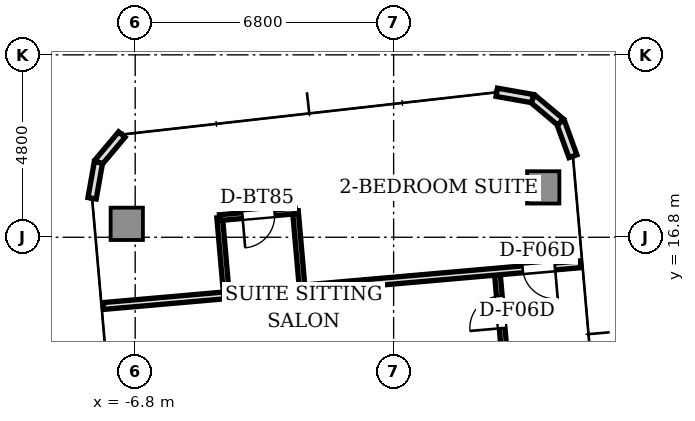
"""IFC4 building model, lengths in metres.
Left out: names, types, materials, properties, quantities, classifications, styles, units other than length and angle.
Written with IfcOpenShell. Run it as: python <this file> out.ifc"""

import sys

from ifc_helpers import new_model, si_unit, direction, frame, frame_2d, origin, origin_2d, place, context, subcontext, project, spatial, rectangle, extrude, source, transform, mapped, element, fill, save


model = new_model("IFC4")
c1 = context("Model", 3, precision=1e-05, world=origin(), true_north=direction((0.0, 1.0)))
c2 = subcontext(c1, "Body", "Model", "MODEL_VIEW")
j1 = project(units=[si_unit("LENGTHUNIT", "METRE"), si_unit("PLANEANGLEUNIT", "RADIAN")], contexts=[c1])
p1 = place(None, origin())
s1 = spatial("IfcSite", under=j1, at=p1, CompositionType="ELEMENT")
p2 = place(p1, origin())
s2 = spatial("IfcBuilding", under=s1, at=p2, CompositionType="ELEMENT")
p3 = place(p2, frame((0.0, 0.0, 198.65)))
s3 = spatial("IfcBuildingStorey", under=s2, at=p3, CompositionType="ELEMENT", Elevation=198.65)
m1 = source(origin(), c2, "Body", "SweptSolid", [
    extrude(rectangle(XDim=0.85, YDim=0.85, at=origin_2d()), origin(), (0.0, 0.0, 1.0), 3.03),
])
for number, where, z_axis, x_axis in (
    (1, (3.936, 18.112, 0.0), (0.0, 0.0, 1.0), (1.0, 0.0, 0.0)),
    (2, (-7.022, 17.153, 0.0), (0.0, 0.0, 1.0), (1.0, 0.0, 0.0)),
):
    element("IfcColumn", number, at=place(p3, frame(where, z_axis=z_axis, x_axis=x_axis)), inside=s3, PredefinedType="COLUMN", context=c2, shape_type="MappedRepresentation", body=[
        mapped(m1, transform((0.0, 0.0, 0.0), scale=1.0)),
    ])
p4 = place(p3, frame((4.718, 18.933, 0.0), z_axis=(0.0, 0.0, 1.0), x_axis=(-0.34188635151, 0.939741306239, 0.0)))
e3 = element("IfcWall", 3, at=p4, inside=s3, PredefinedType="STANDARD", context=c2, shape_type="SweptSolid", body=[
    extrude(rectangle(XDim=0.958, YDim=0.22, at=frame_2d((0.479, 0.0))), origin(), (0.0, 0.0, 1.0), 3.03),
])
for number, where, z_axis, x_axis in (
    (4, (4.39, 19.833, 0.0), (0.0, 0.0, 1.0), (-0.766, 0.643, 0.0)),
    (5, (3.657, 20.449, 0.0), (0.0, 0.0, 1.0), (-0.985, 0.174, 0.0)),
):
    element("IfcWall", number, at=place(p3, frame(where, z_axis=z_axis, x_axis=x_axis)), inside=s3, PredefinedType="STANDARD", context=c2, shape_type="SweptSolid", body=[
        extrude(rectangle(XDim=0.958, YDim=0.22, at=frame_2d((0.479, 0.0))), origin(), (0.0, 0.0, 1.0), 3.03),
    ])
for number, where, z_axis, x_axis in (
    (6, (-7.152, 19.503, 0.0), (0.0, 0.0, 1.0), (-0.643, -0.766, 0.0)),
    (7, (-7.768, 18.769, 0.0), (0.0, 0.0, 1.0), (-0.174, -0.985, 0.0)),
):
    element("IfcWall", number, at=place(p3, frame(where, z_axis=z_axis, x_axis=x_axis)), inside=s3, PredefinedType="STANDARD", context=c2, shape_type="SweptSolid", body=[
        extrude(rectangle(XDim=0.958, YDim=0.22, at=frame_2d((0.479, 0.0))), origin(), (0.0, 0.0, 1.0), 3.03),
    ])
p5 = place(p3, frame((3.095, 11.664, 0.0), z_axis=(0.0, 0.0, 1.0), x_axis=(-0.087142722004, 0.996195837173, 0.0)))
e8 = element("IfcWall", 8, at=p5, inside=s3, PredefinedType="PARTITIONING", context=c2, shape_type="SweptSolid", body=[
    extrude(rectangle(XDim=4.25, YDim=0.15, at=frame_2d((2.125, 0.0))), origin(), (0.0, 0.0, 1.0), 2.58),
])
p6 = place(p5, frame((0.63, 0.0, 0.0)))
e9 = element("IfcOpeningElement", 9, at=p6, cuts=e8, PredefinedType="OPENING", context=c2, shape_type="SweptSolid", body=[
    extrude(rectangle(XDim=0.85, YDim=2.1, at=frame_2d((0.425, 1.05))), frame((0.0, 0.085, 0.0), z_axis=(0.0, -1.0, 0.0), x_axis=(1.0, 0.0, 0.0)), (0.0, 0.0, 1.0), 0.17),
])
p7 = place(p5, frame((2.755, 0.0, 0.0)))
e10 = element("IfcOpeningElement", 10, at=p7, cuts=e8, PredefinedType="OPENING", context=c2, shape_type="SweptSolid", body=[
    extrude(rectangle(XDim=0.85, YDim=2.1, at=frame_2d((0.425, 1.05))), frame((0.0, 0.085, 0.0), z_axis=(0.0, -1.0, 0.0), x_axis=(1.0, 0.0, 0.0)), (0.0, 0.0, 1.0), 0.17),
])
p8 = place(p3, frame((4.917, 16.09, 0.0), z_axis=(0.0, 0.0, 1.0), x_axis=(-0.996196619285, -0.087133780622, 0.0)))
e11 = element("IfcWall", 11, at=p8, inside=s3, PredefinedType="PARTITIONING", context=c2, shape_type="SweptSolid", body=[
    extrude(rectangle(XDim=12.6, YDim=0.18, at=frame_2d((6.3, 0.0))), origin(), (0.0, 0.0, 1.0), 2.58),
])
p9 = place(p8, frame((0.675, 0.0, 0.0)))
e12 = element("IfcOpeningElement", 12, at=p9, cuts=e11, PredefinedType="OPENING", context=c2, shape_type="SweptSolid", body=[
    extrude(rectangle(XDim=0.85, YDim=2.1, at=frame_2d((0.425, 1.05))), frame((0.0, 0.1, 0.0), z_axis=(0.0, -1.0, 0.0), x_axis=(1.0, 0.0, 0.0)), (0.0, 0.0, 1.0), 0.2),
])
for number, where, z_axis, x_axis in (
    (13, (-4.398, 15.275, 0.0), (0.0, 0.0, 1.0), (-0.087, 0.996, 0.0)),
    (14, (-2.406, 15.449, 0.0), (0.0, 0.0, 1.0), (-0.087, 0.996, 0.0)),
):
    element("IfcWall", number, at=place(p3, frame(where, z_axis=z_axis, x_axis=x_axis)), inside=s3, PredefinedType="PARTITIONING", context=c2, shape_type="SweptSolid", body=[
        extrude(rectangle(XDim=2.05, YDim=0.15, at=frame_2d((1.025, 0.0))), origin(), (0.0, 0.0, 1.0), 2.58),
    ])
p10 = place(p3, frame((-2.584, 17.491, 0.0), z_axis=(0.0, 0.0, 1.0), x_axis=(-0.99619464492, -0.087156350505, 0.0)))
e15 = element("IfcWall", 15, at=p10, inside=s3, PredefinedType="PARTITIONING", context=c2, shape_type="SweptSolid", body=[
    extrude(rectangle(XDim=2.0, YDim=0.15, at=frame_2d((1.0, 0.0))), origin(), (0.0, 0.0, 1.0), 2.55),
])
p11 = place(p10, frame((0.55, 0.0, 0.0)))
e16 = element("IfcOpeningElement", 16, at=p11, cuts=e15, PredefinedType="OPENING", context=c2, shape_type="SweptSolid", body=[
    extrude(rectangle(XDim=0.85, YDim=2.1, at=frame_2d((0.425, 1.05))), frame((0.0, 0.085, 0.0), z_axis=(0.0, -1.0, 0.0), x_axis=(1.0, 0.0, 0.0)), (0.0, 0.0, 1.0), 0.17),
])
m2 = source(origin(), c2, "Body", "SweptSolid", [
    extrude(rectangle(XDim=0.85, YDim=0.05, at=origin_2d()), origin(), (0.0, 0.0, 1.0), 2.1),
])
p12 = place(p7, frame((0.425, 0.0, 0.0)))
e17 = element("IfcDoor", 17, at=p12, inside=s3, OperationType="SINGLE_SWING_LEFT", PredefinedType="DOOR", context=c2, shape_type="MappedRepresentation", body=[
    mapped(m2, transform((0.0, 0.0, 0.0), scale=1.0)),
])
fill(e10, e17)
p13 = place(p11, frame((0.425, 0.0, 0.0)))
e18 = element("IfcDoor", 18, at=p13, inside=s3, OperationType="SINGLE_SWING_RIGHT", PredefinedType="DOOR", context=c2, shape_type="MappedRepresentation", body=[
    mapped(m2, transform((0.0, 0.0, 0.0), scale=1.0)),
])
fill(e16, e18)
p14 = place(p9, frame((0.425, 0.0, 0.0)))
e19 = element("IfcDoor", 19, at=p14, inside=s3, OperationType="SINGLE_SWING_LEFT", PredefinedType="DOOR", context=c2, shape_type="MappedRepresentation", body=[
    mapped(m2, transform((0.0, 0.0, 0.0), scale=1.0)),
])
fill(e12, e19)
save(model, sys.argv[1])
